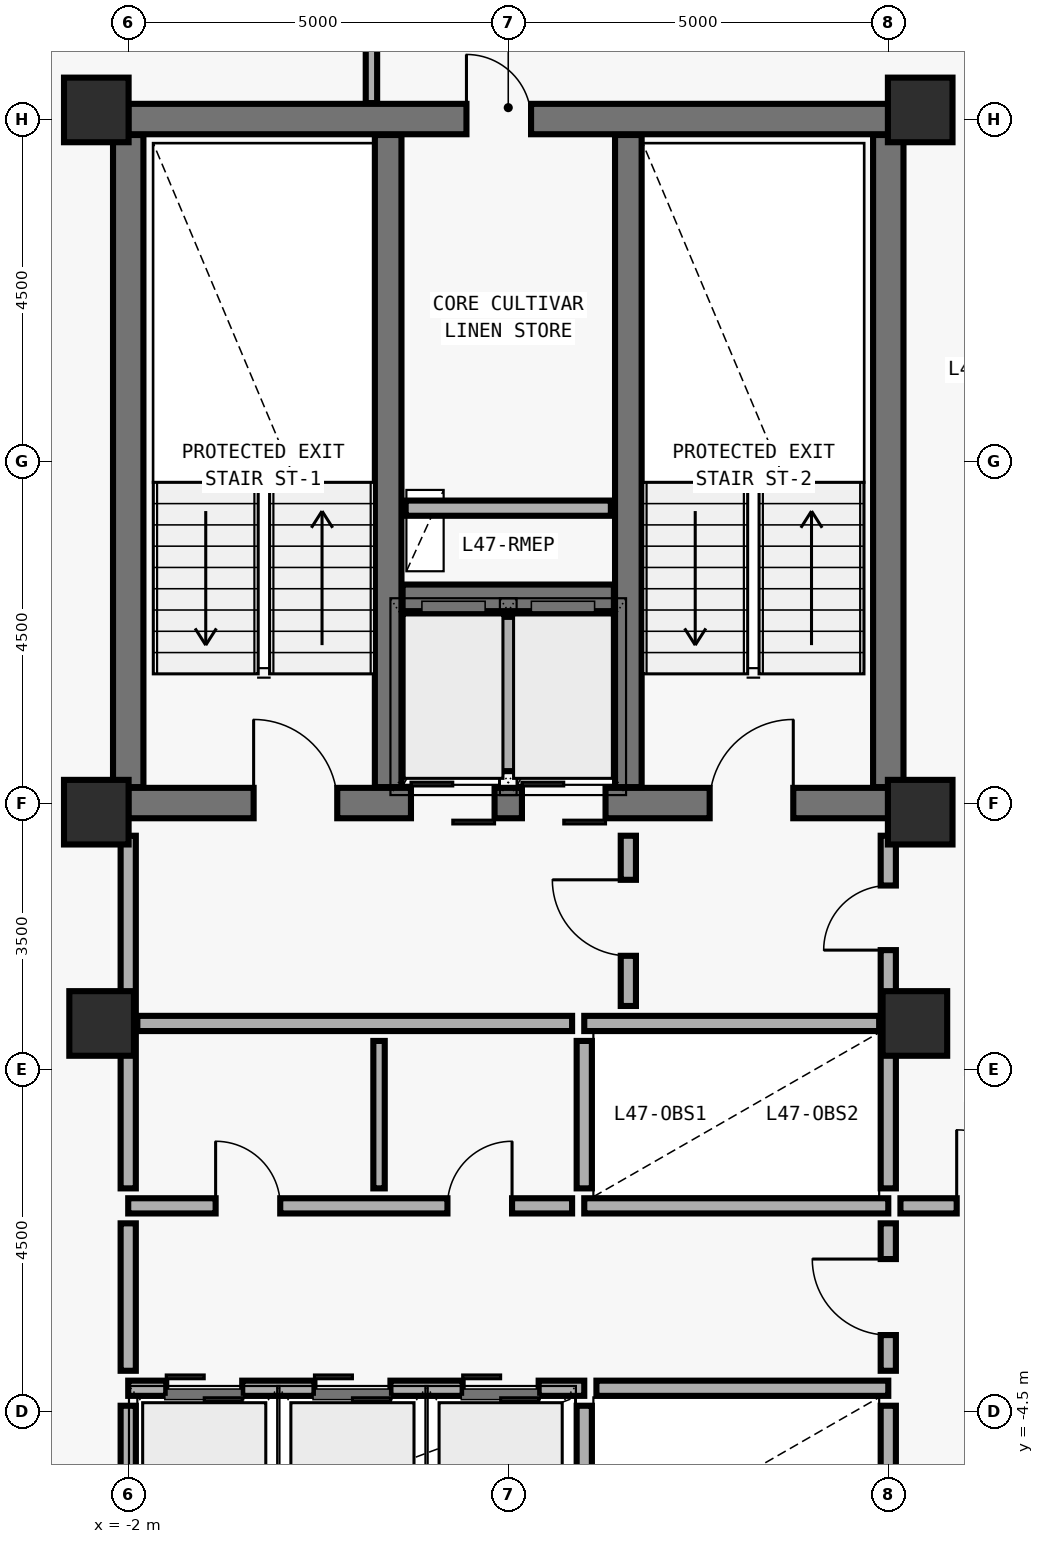
"""IFC4 building model, lengths in metres.
Left out: names, types, materials, properties, quantities, classifications, styles, units other than length and angle.
Written with IfcOpenShell. Run it as: python <this file> out.ifc"""

import sys

from ifc_helpers import new_model, si_unit, direction, frame, frame_2d, origin, origin_2d, place, context, subcontext, project, spatial, rectangle, extrude, element, fill, save


model = new_model("IFC4")
c1 = context("Model", 3, precision=1e-05, world=origin(), true_north=direction((0.0, 1.0)))
c2 = subcontext(c1, "Body", "Model", "MODEL_VIEW")
j1 = project(units=[si_unit("LENGTHUNIT", "METRE"), si_unit("PLANEANGLEUNIT", "RADIAN")], contexts=[c1])
p1 = place(None, origin())
s1 = spatial("IfcSite", under=j1, at=p1, CompositionType="ELEMENT")
p2 = place(p1, origin())
s2 = spatial("IfcBuilding", under=s1, at=p2, CompositionType="ELEMENT")
p3 = place(p2, frame((0.0, 0.0, 189.6)))
s3 = spatial("IfcBuildingStorey", under=s2, at=p3, CompositionType="ELEMENT", Elevation=189.6)
p4 = place(p3, frame((-2.0, 3.5, 0.0), z_axis=(0.0, 0.0, 1.0), x_axis=(1.0, 0.0, 0.0)))
e1 = element("IfcWall", 1, at=p4, inside=s3, PredefinedType="SHEAR", context=c2, shape_type="SweptSolid", body=[
    extrude(rectangle(XDim=10.0, YDim=0.4, at=frame_2d((5.0, 0.0))), origin(), (0.0, 0.0, 1.0), 3.592),
])
p5 = place(p4, frame((1.65, 0.0, 0.0)))
e2 = element("IfcOpeningElement", 2, at=p5, cuts=e1, PredefinedType="OPENING", context=c2, shape_type="SweptSolid", body=[
    extrude(rectangle(XDim=1.1, YDim=2.15, at=frame_2d((0.55, 1.075))), frame((0.0, 0.21, 0.0), z_axis=(0.0, -1.0, 0.0), x_axis=(1.0, 0.0, 0.0)), (0.0, 0.0, 1.0), 0.42),
])
p6 = place(p4, frame((7.65, 0.0, 0.0)))
e3 = element("IfcOpeningElement", 3, at=p6, cuts=e1, PredefinedType="OPENING", context=c2, shape_type="SweptSolid", body=[
    extrude(rectangle(XDim=1.1, YDim=2.15, at=frame_2d((0.55, 1.075))), frame((0.0, 0.21, 0.0), z_axis=(0.0, -1.0, 0.0), x_axis=(1.0, 0.0, 0.0)), (0.0, 0.0, 1.0), 0.42),
])
p7 = place(p4, frame((3.72, 0.0, 0.0)))
e4 = element("IfcOpeningElement", 4, at=p7, cuts=e1, PredefinedType="OPENING", context=c2, shape_type="SweptSolid", body=[
    extrude(rectangle(XDim=1.1, YDim=2.2, at=frame_2d((0.55, 1.1))), frame((0.0, 0.21, 0.0), z_axis=(0.0, -1.0, 0.0), x_axis=(1.0, 0.0, 0.0)), (0.0, 0.0, 1.0), 0.42),
])
p8 = place(p4, frame((5.18, 0.0, 0.0)))
e5 = element("IfcOpeningElement", 5, at=p8, cuts=e1, PredefinedType="OPENING", context=c2, shape_type="SweptSolid", body=[
    extrude(rectangle(XDim=1.1, YDim=2.2, at=frame_2d((0.55, 1.1))), frame((0.0, 0.21, 0.0), z_axis=(0.0, -1.0, 0.0), x_axis=(1.0, 0.0, 0.0)), (0.0, 0.0, 1.0), 0.42),
])
p9 = place(p3, frame((-2.0, 12.5, 0.0), z_axis=(0.0, 0.0, 1.0), x_axis=(1.0, 0.0, 0.0)))
e6 = element("IfcWall", 6, at=p9, inside=s3, PredefinedType="SHEAR", context=c2, shape_type="SweptSolid", body=[
    extrude(rectangle(XDim=10.0, YDim=0.4, at=frame_2d((5.0, 0.0))), origin(), (0.0, 0.0, 1.0), 3.592),
])
p10 = place(p9, frame((4.45, 0.0, 0.0)))
e7 = element("IfcOpeningElement", 7, at=p10, cuts=e6, PredefinedType="OPENING", context=c2, shape_type="SweptSolid", body=[
    extrude(rectangle(XDim=0.85, YDim=2.1, at=frame_2d((0.425, 1.05))), frame((0.0, 0.21, 0.0), z_axis=(0.0, -1.0, 0.0), x_axis=(1.0, 0.0, 0.0)), (0.0, 0.0, 1.0), 0.42),
])
for number, where, z_axis, x_axis in (
    (8, (-2.0, 3.71, 0.0), (0.0, 0.0, 1.0), (0.0, 1.0, 0.0)),
    (9, (8.0, 3.71, 0.0), (0.0, 0.0, 1.0), (0.0, 1.0, 0.0)),
):
    element("IfcWall", number, at=place(p3, frame(where, z_axis=z_axis, x_axis=x_axis)), inside=s3, PredefinedType="SHEAR", context=c2, shape_type="SweptSolid", body=[
        extrude(rectangle(XDim=8.58, YDim=0.4, at=frame_2d((4.29, 0.0))), origin(), (0.0, 0.0, 1.0), 3.592),
    ])
for number, where, z_axis, x_axis in (
    (10, (1.42, 3.71, 0.0), (0.0, 0.0, 1.0), (0.0, 1.0, 0.0)),
    (11, (4.58, 3.71, 0.0), (0.0, 0.0, 1.0), (0.0, 1.0, 0.0)),
):
    element("IfcWall", number, at=place(p3, frame(where, z_axis=z_axis, x_axis=x_axis)), inside=s3, PredefinedType="SHEAR", context=c2, shape_type="SweptSolid", body=[
        extrude(rectangle(XDim=8.58, YDim=0.35, at=frame_2d((4.29, 0.0))), origin(), (0.0, 0.0, 1.0), 3.592),
    ])
p11 = place(p3, frame((1.61, 6.2, 0.0), z_axis=(0.0, 0.0, 1.0), x_axis=(1.0, 0.0, 0.0)))
e12 = element("IfcWall", 12, at=p11, inside=s3, PredefinedType="SHEAR", context=c2, shape_type="SweptSolid", body=[
    extrude(rectangle(XDim=2.78, YDim=0.35, at=frame_2d((1.39, 0.0))), origin(), (0.0, 0.0, 1.0), 3.592),
])
for number, where, z_axis, x_axis in (
    (13, (-2.42, 12.62, 0.0), (0.0, 0.0, 1.0), (1.0, 0.0, 0.0)),
    (14, (8.42, 12.62, 0.0), (0.0, 0.0, 1.0), (1.0, 0.0, 0.0)),
    (15, (-2.42, 3.38, 0.0), (0.0, 0.0, 1.0), (1.0, 0.0, 0.0)),
    (16, (8.42, 3.38, 0.0), (0.0, 0.0, 1.0), (1.0, 0.0, 0.0)),
    (17, (-2.35, 0.6, 0.0), (0.0, 0.0, 1.0), (1.0, 0.0, 0.0)),
    (18, (8.35, 0.6, 0.0), (0.0, 0.0, 1.0), (1.0, 0.0, 0.0)),
):
    element("IfcColumn", number, at=place(p3, frame(where, z_axis=z_axis, x_axis=x_axis)), inside=s3, PredefinedType="COLUMN", context=c2, shape_type="SweptSolid", body=[
        extrude(rectangle(XDim=0.85, YDim=0.85, at=origin_2d()), origin(), (0.0, 0.0, 1.0), 3.575),
    ])
p12 = place(p3, frame((3.0, 3.92, 0.0), z_axis=(0.0, 0.0, 1.0), x_axis=(0.0, 1.0, 0.0)))
e19 = element("IfcWall", 19, at=p12, inside=s3, PredefinedType="SOLIDWALL", context=c2, shape_type="SweptSolid", body=[
    extrude(rectangle(XDim=2.03, YDim=0.2, at=frame_2d((1.015, 0.0))), origin(), (0.0, 0.0, 1.0), 3.36),
])
p13 = place(p3, frame((1.65, 7.38, 0.0), z_axis=(0.0, 0.0, 1.0), x_axis=(1.0, 0.0, 0.0)))
e20 = element("IfcWall", 20, at=p13, inside=s3, PredefinedType="SOLIDWALL", context=c2, shape_type="SweptSolid", body=[
    extrude(rectangle(XDim=2.7, YDim=0.2, at=frame_2d((1.35, 0.0))), origin(), (0.0, 0.0, 1.0), 3.36),
])
p14 = place(p3, frame((4.0, 0.6, 0.0), z_axis=(0.0, 0.0, 1.0), x_axis=(1.0, 0.0, 0.0)))
e21 = element("IfcWall", 21, at=p14, inside=s3, PredefinedType="SOLIDWALL", context=c2, shape_type="SweptSolid", body=[
    extrude(rectangle(XDim=3.88, YDim=0.2, at=frame_2d((1.94, 0.0))), origin(), (0.0, 0.0, 1.0), 3.012),
])
p15 = place(p3, frame((4.0, -1.8, 0.0), z_axis=(0.0, 0.0, 1.0), x_axis=(1.0, 0.0, 0.0)))
e22 = element("IfcWall", 22, at=p15, inside=s3, PredefinedType="SOLIDWALL", context=c2, shape_type="SweptSolid", body=[
    extrude(rectangle(XDim=4.0, YDim=0.2, at=frame_2d((2.0, 0.0))), origin(), (0.0, 0.0, 1.0), 3.36),
])
p16 = place(p3, frame((4.0, -1.57, 0.0), z_axis=(0.0, 0.0, 1.0), x_axis=(0.0, 1.0, 0.0)))
e23 = element("IfcWall", 23, at=p16, inside=s3, PredefinedType="SOLIDWALL", context=c2, shape_type="SweptSolid", body=[
    extrude(rectangle(XDim=1.94, YDim=0.2, at=frame_2d((0.97, 0.0))), origin(), (0.0, 0.0, 1.0), 3.36),
])
p17 = place(p3, frame((8.0, -1.57, 0.0), z_axis=(0.0, 0.0, 1.0), x_axis=(0.0, 1.0, 0.0)))
e24 = element("IfcWall", 24, at=p17, inside=s3, PredefinedType="SOLIDWALL", context=c2, shape_type="SweptSolid", body=[
    extrude(rectangle(XDim=2.05, YDim=0.2, at=frame_2d((1.025, 0.0))), origin(), (0.0, 0.0, 1.0), 3.012),
])
p18 = place(p3, frame((-2.0, -4.2, 0.0), z_axis=(0.0, 0.0, 1.0), x_axis=(1.0, 0.0, 0.0)))
e25 = element("IfcWall", 25, at=p18, inside=s3, PredefinedType="SOLIDWALL", context=c2, shape_type="SweptSolid", body=[
    extrude(rectangle(XDim=6.0, YDim=0.2, at=frame_2d((3.0, 0.0))), origin(), (0.0, 0.0, 1.0), 3.36),
])
p19 = place(p18, frame((0.5, 0.0, 0.0)))
e26 = element("IfcOpeningElement", 26, at=p19, cuts=e25, PredefinedType="OPENING", context=c2, shape_type="SweptSolid", body=[
    extrude(rectangle(XDim=1.0, YDim=2.2, at=frame_2d((0.5, 1.1))), frame((0.0, 0.11, 0.0), z_axis=(0.0, -1.0, 0.0), x_axis=(1.0, 0.0, 0.0)), (0.0, 0.0, 1.0), 0.22),
])
p20 = place(p18, frame((2.45, 0.0, 0.0)))
e27 = element("IfcOpeningElement", 27, at=p20, cuts=e25, PredefinedType="OPENING", context=c2, shape_type="SweptSolid", body=[
    extrude(rectangle(XDim=1.0, YDim=2.2, at=frame_2d((0.5, 1.1))), frame((0.0, 0.11, 0.0), z_axis=(0.0, -1.0, 0.0), x_axis=(1.0, 0.0, 0.0)), (0.0, 0.0, 1.0), 0.22),
])
p21 = place(p18, frame((4.4, 0.0, 0.0)))
e28 = element("IfcOpeningElement", 28, at=p21, cuts=e25, PredefinedType="OPENING", context=c2, shape_type="SweptSolid", body=[
    extrude(rectangle(XDim=1.0, YDim=2.2, at=frame_2d((0.5, 1.1))), frame((0.0, 0.11, 0.0), z_axis=(0.0, -1.0, 0.0), x_axis=(1.0, 0.0, 0.0)), (0.0, 0.0, 1.0), 0.22),
])
p22 = place(p3, frame((-2.0, -6.37, 0.0), z_axis=(0.0, 0.0, 1.0), x_axis=(0.0, 1.0, 0.0)))
e29 = element("IfcWall", 29, at=p22, inside=s3, PredefinedType="SOLIDWALL", context=c2, shape_type="SweptSolid", body=[
    extrude(rectangle(XDim=1.94, YDim=0.2, at=frame_2d((0.97, 0.0))), origin(), (0.0, 0.0, 1.0), 3.012),
])
p23 = place(p3, frame((4.16, -4.2, 0.0), z_axis=(0.0, 0.0, 1.0), x_axis=(1.0, 0.0, 0.0)))
e30 = element("IfcWall", 30, at=p23, inside=s3, PredefinedType="SOLIDWALL", context=c2, shape_type="SweptSolid", body=[
    extrude(rectangle(XDim=3.84, YDim=0.2, at=frame_2d((1.92, 0.0))), origin(), (0.0, 0.0, 1.0), 3.36),
])
p24 = place(p3, frame((4.0, -6.37, 0.0), z_axis=(0.0, 0.0, 1.0), x_axis=(0.0, 1.0, 0.0)))
e31 = element("IfcWall", 31, at=p24, inside=s3, PredefinedType="SOLIDWALL", context=c2, shape_type="SweptSolid", body=[
    extrude(rectangle(XDim=1.94, YDim=0.2, at=frame_2d((0.97, 0.0))), origin(), (0.0, 0.0, 1.0), 3.36),
])
p25 = place(p3, frame((8.0, -6.37, 0.0), z_axis=(0.0, 0.0, 1.0), x_axis=(0.0, 1.0, 0.0)))
e32 = element("IfcWall", 32, at=p25, inside=s3, PredefinedType="SOLIDWALL", context=c2, shape_type="SweptSolid", body=[
    extrude(rectangle(XDim=1.94, YDim=0.2, at=frame_2d((0.97, 0.0))), origin(), (0.0, 0.0, 1.0), 3.012),
])
p26 = place(p3, frame((4.58, 0.83, 0.0), z_axis=(0.0, 0.0, 1.0), x_axis=(0.0, 1.0, 0.0)))
e33 = element("IfcWall", 33, at=p26, inside=s3, PredefinedType="MOVABLE", context=c2, shape_type="SweptSolid", body=[
    extrude(rectangle(XDim=2.24, YDim=0.2, at=frame_2d((1.12, 0.0))), origin(), (0.0, 0.0, 1.0), 3.36),
])
p27 = place(p26, frame((0.66, 0.0, 0.0)))
e34 = element("IfcOpeningElement", 34, at=p27, cuts=e33, PredefinedType="OPENING", context=c2, shape_type="SweptSolid", body=[
    extrude(rectangle(XDim=1.0, YDim=2.1, at=frame_2d((0.5, 1.05))), frame((0.0, 0.11, 0.0), z_axis=(0.0, -1.0, 0.0), x_axis=(1.0, 0.0, 0.0)), (0.0, 0.0, 1.0), 0.22),
])
p28 = place(p3, frame((8.0, 0.72, 0.0), z_axis=(0.0, 0.0, 1.0), x_axis=(0.0, 1.0, 0.0)))
e35 = element("IfcWall", 35, at=p28, inside=s3, PredefinedType="MOVABLE", context=c2, shape_type="SweptSolid", body=[
    extrude(rectangle(XDim=2.35, YDim=0.2, at=frame_2d((1.175, 0.0))), origin(), (0.0, 0.0, 1.0), 2.692),
])
p29 = place(p28, frame((0.845, 0.0, 0.0)))
e36 = element("IfcOpeningElement", 36, at=p29, cuts=e35, PredefinedType="OPENING", context=c2, shape_type="SweptSolid", body=[
    extrude(rectangle(XDim=0.85, YDim=2.1, at=frame_2d((0.425, 1.05))), frame((0.0, 0.11, 0.0), z_axis=(0.0, -1.0, 0.0), x_axis=(1.0, 0.0, 0.0)), (0.0, 0.0, 1.0), 0.22),
])
p30 = place(p3, frame((8.0, -3.97, 0.0), z_axis=(0.0, 0.0, 1.0), x_axis=(0.0, 1.0, 0.0)))
e37 = element("IfcWall", 37, at=p30, inside=s3, PredefinedType="MOVABLE", context=c2, shape_type="SweptSolid", body=[
    extrude(rectangle(XDim=1.94, YDim=0.2, at=frame_2d((0.97, 0.0))), origin(), (0.0, 0.0, 1.0), 3.012),
])
p31 = place(p30, frame((0.47, 0.0, 0.0)))
e38 = element("IfcOpeningElement", 38, at=p31, cuts=e37, PredefinedType="OPENING", context=c2, shape_type="SweptSolid", body=[
    extrude(rectangle(XDim=1.0, YDim=2.1, at=frame_2d((0.5, 1.05))), frame((0.0, 0.11, 0.0), z_axis=(0.0, -1.0, 0.0), x_axis=(1.0, 0.0, 0.0)), (0.0, 0.0, 1.0), 0.22),
])
p32 = place(p3, frame((-2.0, -1.8, 0.0), z_axis=(0.0, 0.0, 1.0), x_axis=(1.0, 0.0, 0.0)))
e39 = element("IfcWall", 39, at=p32, inside=s3, PredefinedType="MOVABLE", context=c2, shape_type="SweptSolid", body=[
    extrude(rectangle(XDim=5.84, YDim=0.2, at=frame_2d((2.92, 0.0))), origin(), (0.0, 0.0, 1.0), 3.36),
])
p33 = place(p32, frame((1.15, 0.0, 0.0)))
e40 = element("IfcOpeningElement", 40, at=p33, cuts=e39, PredefinedType="OPENING", context=c2, shape_type="SweptSolid", body=[
    extrude(rectangle(XDim=0.85, YDim=2.1, at=frame_2d((0.425, 1.05))), frame((0.0, 0.11, 0.0), z_axis=(0.0, -1.0, 0.0), x_axis=(1.0, 0.0, 0.0)), (0.0, 0.0, 1.0), 0.22),
])
p34 = place(p32, frame((4.2, 0.0, 0.0)))
e41 = element("IfcOpeningElement", 41, at=p34, cuts=e39, PredefinedType="OPENING", context=c2, shape_type="SweptSolid", body=[
    extrude(rectangle(XDim=0.85, YDim=2.1, at=frame_2d((0.425, 1.05))), frame((0.0, 0.11, 0.0), z_axis=(0.0, -1.0, 0.0), x_axis=(1.0, 0.0, 0.0)), (0.0, 0.0, 1.0), 0.22),
])
p35 = place(p3, frame((8.16, -1.8, 0.0), z_axis=(0.0, 0.0, 1.0), x_axis=(1.0, 0.0, 0.0)))
e42 = element("IfcWall", 42, at=p35, inside=s3, PredefinedType="MOVABLE", context=c2, shape_type="SweptSolid", body=[
    extrude(rectangle(XDim=2.64, YDim=0.2, at=frame_2d((1.32, 0.0))), origin(), (0.0, 0.0, 1.0), 3.36),
])
p36 = place(p35, frame((0.74, 0.0, 0.0)))
e43 = element("IfcOpeningElement", 43, at=p36, cuts=e42, PredefinedType="OPENING", context=c2, shape_type="SweptSolid", body=[
    extrude(rectangle(XDim=1.0, YDim=2.1, at=frame_2d((0.5, 1.05))), frame((0.0, 0.11, 0.0), z_axis=(0.0, -1.0, 0.0), x_axis=(1.0, 0.0, 0.0)), (0.0, 0.0, 1.0), 0.22),
])
p37 = place(p3, frame((-1.88, 0.6, 0.0), z_axis=(0.0, 0.0, 1.0), x_axis=(1.0, 0.0, 0.0)))
e44 = element("IfcWall", 44, at=p37, inside=s3, PredefinedType="MOVABLE", context=c2, shape_type="SweptSolid", body=[
    extrude(rectangle(XDim=5.72, YDim=0.2, at=frame_2d((2.86, 0.0))), origin(), (0.0, 0.0, 1.0), 3.012),
])
p38 = place(p3, frame((-2.0, 0.72, 0.0), z_axis=(0.0, 0.0, 1.0), x_axis=(0.0, 1.0, 0.0)))
e45 = element("IfcWall", 45, at=p38, inside=s3, PredefinedType="MOVABLE", context=c2, shape_type="SweptSolid", body=[
    extrude(rectangle(XDim=2.35, YDim=0.2, at=frame_2d((1.175, 0.0))), origin(), (0.0, 0.0, 1.0), 2.692),
])
p39 = place(p3, frame((-2.0, -3.97, 0.0), z_axis=(0.0, 0.0, 1.0), x_axis=(0.0, 1.0, 0.0)))
e46 = element("IfcWall", 46, at=p39, inside=s3, PredefinedType="MOVABLE", context=c2, shape_type="SweptSolid", body=[
    extrude(rectangle(XDim=1.94, YDim=0.2, at=frame_2d((0.97, 0.0))), origin(), (0.0, 0.0, 1.0), 3.012),
])
p40 = place(p3, frame((1.3, -1.57, 0.0), z_axis=(0.0, 0.0, 1.0), x_axis=(0.0, 1.0, 0.0)))
e47 = element("IfcWall", 47, at=p40, inside=s3, PredefinedType="PARTITIONING", context=c2, shape_type="SweptSolid", body=[
    extrude(rectangle(XDim=1.94, YDim=0.15, at=frame_2d((0.97, 0.0))), origin(), (0.0, 0.0, 1.0), 3.36),
])
p41 = place(p3, frame((-2.0, -1.57, 0.0), z_axis=(0.0, 0.0, 1.0), x_axis=(0.0, 1.0, 0.0)))
e48 = element("IfcWall", 48, at=p41, inside=s3, PredefinedType="MOVABLE", context=c2, shape_type="SweptSolid", body=[
    extrude(rectangle(XDim=2.05, YDim=0.2, at=frame_2d((1.025, 0.0))), origin(), (0.0, 0.0, 1.0), 3.012),
])
p42 = place(p3, frame((1.2, 14.615, 0.0), z_axis=(0.0, 0.0, 1.0), x_axis=(0.0, -1.0, 0.0)))
e49 = element("IfcWall", 49, at=p42, inside=s3, PredefinedType="PARTITIONING", context=c2, shape_type="SweptSolid", body=[
    extrude(rectangle(XDim=1.905, YDim=0.15, at=frame_2d((0.953, 0.0))), origin(), (0.0, 0.0, 1.0), 3.36),
])
p43 = place(p5, origin())
e50 = element("IfcDoor", 50, at=p43, inside=s3, OperationType="SINGLE_SWING_LEFT", PredefinedType="DOOR", context=c2, shape_type="SweptSolid", body=[
    extrude(rectangle(XDim=1.1, YDim=2.15, at=frame_2d((0.55, 1.075))), frame((0.0, 0.025, 0.0), z_axis=(0.0, -1.0, 0.0), x_axis=(1.0, 0.0, 0.0)), (0.0, 0.0, 1.0), 0.05),
])
fill(e2, e50)
p44 = place(p6, origin())
e51 = element("IfcDoor", 51, at=p44, inside=s3, OperationType="SINGLE_SWING_RIGHT", PredefinedType="DOOR", context=c2, shape_type="SweptSolid", body=[
    extrude(rectangle(XDim=1.1, YDim=2.15, at=frame_2d((0.55, 1.075))), frame((0.0, 0.025, 0.0), z_axis=(0.0, -1.0, 0.0), x_axis=(1.0, 0.0, 0.0)), (0.0, 0.0, 1.0), 0.05),
])
fill(e3, e51)
p45 = place(p7, origin())
e52 = element("IfcDoor", 52, at=p45, inside=s3, OperationType="DOUBLE_DOOR_SLIDING", PredefinedType="DOOR", context=c2, shape_type="SweptSolid", body=[
    extrude(rectangle(XDim=1.1, YDim=2.2, at=frame_2d((0.55, 1.1))), frame((0.0, 0.025, 0.0), z_axis=(0.0, -1.0, 0.0), x_axis=(1.0, 0.0, 0.0)), (0.0, 0.0, 1.0), 0.05),
])
fill(e4, e52)
p46 = place(p8, origin())
e53 = element("IfcDoor", 53, at=p46, inside=s3, OperationType="DOUBLE_DOOR_SLIDING", PredefinedType="DOOR", context=c2, shape_type="SweptSolid", body=[
    extrude(rectangle(XDim=1.1, YDim=2.2, at=frame_2d((0.55, 1.1))), frame((0.0, 0.025, 0.0), z_axis=(0.0, -1.0, 0.0), x_axis=(1.0, 0.0, 0.0)), (0.0, 0.0, 1.0), 0.05),
])
fill(e5, e53)
p47 = place(p10, origin())
e54 = element("IfcDoor", 54, at=p47, inside=s3, OperationType="SINGLE_SWING_LEFT", PredefinedType="DOOR", context=c2, shape_type="SweptSolid", body=[
    extrude(rectangle(XDim=0.85, YDim=2.1, at=frame_2d((0.425, 1.05))), frame((0.0, 0.025, 0.0), z_axis=(0.0, -1.0, 0.0), x_axis=(1.0, 0.0, 0.0)), (0.0, 0.0, 1.0), 0.05),
])
fill(e7, e54)
p48 = place(p27, origin())
e55 = element("IfcDoor", 55, at=p48, inside=s3, OperationType="SINGLE_SWING_RIGHT", PredefinedType="DOOR", context=c2, shape_type="SweptSolid", body=[
    extrude(rectangle(XDim=1.0, YDim=2.1, at=frame_2d((0.5, 1.05))), frame((0.0, 0.025, 0.0), z_axis=(0.0, -1.0, 0.0), x_axis=(1.0, 0.0, 0.0)), (0.0, 0.0, 1.0), 0.05),
])
fill(e34, e55)
p49 = place(p29, origin())
e56 = element("IfcDoor", 56, at=p49, inside=s3, OperationType="SINGLE_SWING_LEFT", PredefinedType="DOOR", context=c2, shape_type="SweptSolid", body=[
    extrude(rectangle(XDim=0.85, YDim=2.1, at=frame_2d((0.425, 1.05))), frame((0.0, 0.025, 0.0), z_axis=(0.0, -1.0, 0.0), x_axis=(1.0, 0.0, 0.0)), (0.0, 0.0, 1.0), 0.05),
])
fill(e36, e56)
p50 = place(p31, origin())
e57 = element("IfcDoor", 57, at=p50, inside=s3, OperationType="SINGLE_SWING_RIGHT", PredefinedType="DOOR", context=c2, shape_type="SweptSolid", body=[
    extrude(rectangle(XDim=1.0, YDim=2.1, at=frame_2d((0.5, 1.05))), frame((0.0, 0.025, 0.0), z_axis=(0.0, -1.0, 0.0), x_axis=(1.0, 0.0, 0.0)), (0.0, 0.0, 1.0), 0.05),
])
fill(e38, e57)
p51 = place(p33, origin())
e58 = element("IfcDoor", 58, at=p51, inside=s3, OperationType="SINGLE_SWING_LEFT", PredefinedType="DOOR", context=c2, shape_type="SweptSolid", body=[
    extrude(rectangle(XDim=0.85, YDim=2.1, at=frame_2d((0.425, 1.05))), frame((0.0, 0.025, 0.0), z_axis=(0.0, -1.0, 0.0), x_axis=(1.0, 0.0, 0.0)), (0.0, 0.0, 1.0), 0.05),
])
fill(e40, e58)
p52 = place(p34, origin())
e59 = element("IfcDoor", 59, at=p52, inside=s3, OperationType="SINGLE_SWING_RIGHT", PredefinedType="DOOR", context=c2, shape_type="SweptSolid", body=[
    extrude(rectangle(XDim=0.85, YDim=2.1, at=frame_2d((0.425, 1.05))), frame((0.0, 0.025, 0.0), z_axis=(0.0, -1.0, 0.0), x_axis=(1.0, 0.0, 0.0)), (0.0, 0.0, 1.0), 0.05),
])
fill(e41, e59)
p53 = place(p36, origin())
e60 = element("IfcDoor", 60, at=p53, inside=s3, OperationType="SINGLE_SWING_LEFT", PredefinedType="DOOR", context=c2, shape_type="SweptSolid", body=[
    extrude(rectangle(XDim=1.0, YDim=2.1, at=frame_2d((0.5, 1.05))), frame((0.0, 0.025, 0.0), z_axis=(0.0, -1.0, 0.0), x_axis=(1.0, 0.0, 0.0)), (0.0, 0.0, 1.0), 0.05),
])
fill(e43, e60)
p54 = place(p19, origin())
e61 = element("IfcDoor", 61, at=p54, inside=s3, OperationType="DOUBLE_DOOR_SLIDING", PredefinedType="DOOR", context=c2, shape_type="SweptSolid", body=[
    extrude(rectangle(XDim=1.0, YDim=2.2, at=frame_2d((0.5, 1.1))), frame((0.0, 0.025, 0.0), z_axis=(0.0, -1.0, 0.0), x_axis=(1.0, 0.0, 0.0)), (0.0, 0.0, 1.0), 0.05),
])
fill(e26, e61)
p55 = place(p20, origin())
e62 = element("IfcDoor", 62, at=p55, inside=s3, OperationType="DOUBLE_DOOR_SLIDING", PredefinedType="DOOR", context=c2, shape_type="SweptSolid", body=[
    extrude(rectangle(XDim=1.0, YDim=2.2, at=frame_2d((0.5, 1.1))), frame((0.0, 0.025, 0.0), z_axis=(0.0, -1.0, 0.0), x_axis=(1.0, 0.0, 0.0)), (0.0, 0.0, 1.0), 0.05),
])
fill(e27, e62)
p56 = place(p21, origin())
e63 = element("IfcDoor", 63, at=p56, inside=s3, OperationType="DOUBLE_DOOR_SLIDING", PredefinedType="DOOR", context=c2, shape_type="SweptSolid", body=[
    extrude(rectangle(XDim=1.0, YDim=2.2, at=frame_2d((0.5, 1.1))), frame((0.0, 0.025, 0.0), z_axis=(0.0, -1.0, 0.0), x_axis=(1.0, 0.0, 0.0)), (0.0, 0.0, 1.0), 0.05),
])
fill(e28, e63)
save(model, sys.argv[1])
